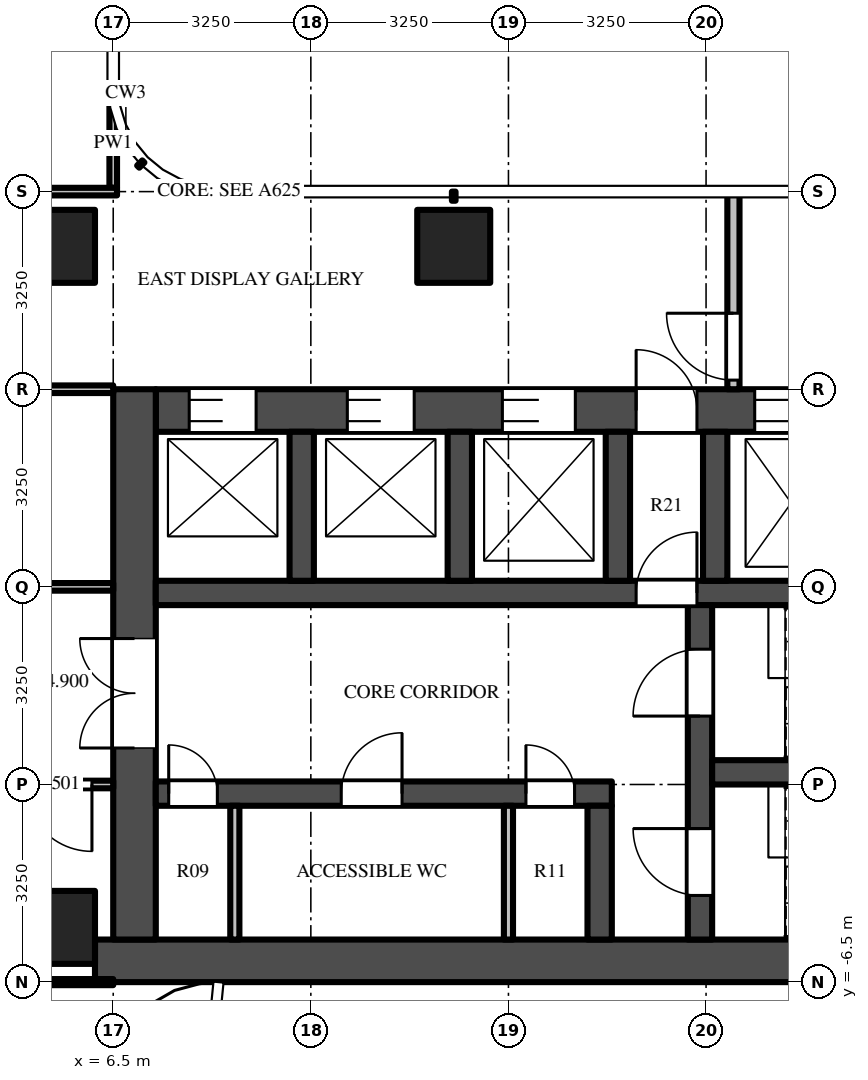
"""IFC4 building model, lengths in metres.
Left out: names, types, materials, properties, quantities, classifications, styles, units other than length and angle.
Written with IfcOpenShell. Run it as: python <this file> out.ifc"""

import sys

from ifc_helpers import new_model, si_unit, direction, frame, frame_2d, origin, origin_2d, place, context, subcontext, project, spatial, rectangle, extrude, source, transform, mapped, element, fill, save


model = new_model("IFC4")
c1 = context("Model", 3, precision=1e-05, world=origin(), true_north=direction((0.0, 1.0)))
c2 = subcontext(c1, "Body", "Model", "MODEL_VIEW")
j1 = project(units=[si_unit("LENGTHUNIT", "METRE"), si_unit("PLANEANGLEUNIT", "RADIAN")], contexts=[c1])
p1 = place(None, origin())
s1 = spatial("IfcSite", under=j1, at=p1, CompositionType="ELEMENT")
p2 = place(p1, origin())
s2 = spatial("IfcBuilding", under=s1, at=p2, CompositionType="ELEMENT")
p3 = place(p2, frame((0.0, 0.0, 204.9)))
s3 = spatial("IfcBuildingStorey", under=s2, at=p3, CompositionType="ELEMENT", Elevation=204.9)
m1 = source(origin(), c2, "Body", "SweptSolid", [
    extrude(rectangle(XDim=1.2, YDim=1.2, at=origin_2d()), origin(), (0.0, 0.0, 1.0), 3.9),
])
for number, where, z_axis, x_axis in (
    (1, (12.1, 5.6, 0.0), (0.0, 0.0, 1.0), (1.0, 0.0, 0.0)),
    (2, (5.6, 5.6, 0.0), (0.0, 0.0, 1.0), (1.0, 0.0, 0.0)),
    (3, (5.6, -5.6, 0.0), (0.0, 0.0, 1.0), (1.0, 0.0, 0.0)),
):
    element("IfcColumn", number, at=place(p3, frame(where, z_axis=z_axis, x_axis=x_axis)), inside=s3, PredefinedType="COLUMN", context=c2, shape_type="MappedRepresentation", body=[
        mapped(m1, transform((0.0, 0.0, 0.0))),
    ])
m2 = source(origin(), c2, "Body", "SweptSolid", [
    extrude(rectangle(XDim=16.55, YDim=0.7, at=frame_2d((8.275, 0.0))), origin(), (0.0, 0.0, 1.0), 3.7),
])
p4 = place(p3, frame((6.2, -6.15, 0.0), z_axis=(0.0, 0.0, 1.0), x_axis=(1.0, 0.0, 0.0)))
e4 = element("IfcWall", 4, at=p4, inside=s3, PredefinedType="SHEAR", context=c2, shape_type="MappedRepresentation", body=[
    mapped(m2, transform((0.0, 0.0, 0.0))),
])
m3 = source(origin(), c2, "Body", "SweptSolid", [
    extrude(rectangle(XDim=14.85, YDim=0.7, at=frame_2d((7.425, 0.0))), origin(), (0.0, 0.0, 1.0), 3.7),
])
p5 = place(p3, frame((7.2, 2.9, 0.0), z_axis=(0.0, 0.0, 1.0), x_axis=(1.0, 0.0, 0.0)))
e5 = element("IfcWall", 5, at=p5, inside=s3, PredefinedType="SHEAR", context=c2, shape_type="MappedRepresentation", body=[
    mapped(m3, transform((0.0, 0.0, 0.0))),
])
m4 = source(origin(), c2, "Body", "SweptSolid", [
    extrude(rectangle(XDim=1.1, YDim=2.1, at=frame_2d((0.55, 1.05))), frame((0.0, 0.36, 0.0), z_axis=(0.0, -1.0, 0.0), x_axis=(1.0, 0.0, 0.0)), (0.0, 0.0, 1.0), 0.72),
])
p6 = place(p5, frame((0.55, 0.0, 0.0)))
e6 = element("IfcOpeningElement", 6, at=p6, cuts=e5, PredefinedType="OPENING", context=c2, shape_type="MappedRepresentation", body=[
    mapped(m4, transform((0.0, 0.0, 0.0))),
])
p7 = place(p5, frame((3.15, 0.0, 0.0)))
e7 = element("IfcOpeningElement", 7, at=p7, cuts=e5, PredefinedType="OPENING", context=c2, shape_type="MappedRepresentation", body=[
    mapped(m4, transform((0.0, 0.0, 0.0))),
])
m5 = source(origin(), c2, "Body", "SweptSolid", [
    extrude(rectangle(XDim=1.2, YDim=2.1, at=frame_2d((0.6, 1.05))), frame((0.0, 0.36, 0.0), z_axis=(0.0, -1.0, 0.0), x_axis=(1.0, 0.0, 0.0)), (0.0, 0.0, 1.0), 0.72),
])
p8 = place(p5, frame((5.7, 0.0, 0.0)))
e8 = element("IfcOpeningElement", 8, at=p8, cuts=e5, PredefinedType="OPENING", context=c2, shape_type="MappedRepresentation", body=[
    mapped(m5, transform((0.0, 0.0, 0.0))),
])
m6 = source(origin(), c2, "Body", "SweptSolid", [
    extrude(rectangle(XDim=1.3, YDim=2.1, at=frame_2d((0.65, 1.05))), frame((0.0, 0.36, 0.0), z_axis=(0.0, -1.0, 0.0), x_axis=(1.0, 0.0, 0.0)), (0.0, 0.0, 1.0), 0.72),
])
p9 = place(p5, frame((12.2, 0.0, 0.0)))
e9 = element("IfcOpeningElement", 9, at=p9, cuts=e5, PredefinedType="OPENING", context=c2, shape_type="MappedRepresentation", body=[
    mapped(m6, transform((0.0, 0.0, 0.0))),
])
p10 = place(p5, frame((9.85, 0.0, 0.0)))
e10 = element("IfcOpeningElement", 10, at=p10, cuts=e5, PredefinedType="OPENING", context=c2, shape_type="MappedRepresentation", body=[
    mapped(m5, transform((0.0, 0.0, 0.0))),
])
m7 = source(origin(), c2, "Body", "SweptSolid", [
    extrude(rectangle(XDim=1.0, YDim=2.1, at=frame_2d((0.5, 1.05))), frame((0.0, 0.36, 0.0), z_axis=(0.0, -1.0, 0.0), x_axis=(1.0, 0.0, 0.0)), (0.0, 0.0, 1.0), 0.72),
])
p11 = place(p5, frame((7.9, 0.0, 0.0)))
e11 = element("IfcOpeningElement", 11, at=p11, cuts=e5, PredefinedType="OPENING", context=c2, shape_type="MappedRepresentation", body=[
    mapped(m7, transform((0.0, 0.0, 0.0))),
])
m8 = source(origin(), c2, "Body", "SweptSolid", [
    extrude(rectangle(XDim=9.05, YDim=0.7, at=frame_2d((4.525, 0.0))), origin(), (0.0, 0.0, 1.0), 3.7),
])
p12 = place(p3, frame((6.85, -5.8, 0.0), z_axis=(0.0, 0.0, 1.0), x_axis=(0.0, 1.0, 0.0)))
e12 = element("IfcWall", 12, at=p12, inside=s3, PredefinedType="SHEAR", context=c2, shape_type="MappedRepresentation", body=[
    mapped(m8, transform((0.0, 0.0, 0.0))),
])
m9 = source(origin(), c2, "Body", "SweptSolid", [
    extrude(rectangle(XDim=1.8, YDim=2.1, at=frame_2d((0.9, 1.05))), frame((0.0, 0.36, 0.0), z_axis=(0.0, -1.0, 0.0), x_axis=(1.0, 0.0, 0.0)), (0.0, 0.0, 1.0), 0.72),
])
p13 = place(p12, frame((3.15, 0.0, 0.0)))
e13 = element("IfcOpeningElement", 13, at=p13, cuts=e12, PredefinedType="OPENING", context=c2, shape_type="MappedRepresentation", body=[
    mapped(m9, transform((0.0, 0.0, 0.0))),
])
m10 = source(origin(), c2, "Body", "SweptSolid", [
    extrude(rectangle(XDim=7.5, YDim=0.4, at=frame_2d((3.75, 0.0))), origin(), (0.0, 0.0, 1.0), 3.7),
])
p14 = place(p3, frame((7.2, -3.4, 0.0), z_axis=(0.0, 0.0, 1.0), x_axis=(1.0, 0.0, 0.0)))
e14 = element("IfcWall", 14, at=p14, inside=s3, PredefinedType="SHEAR", context=c2, shape_type="MappedRepresentation", body=[
    mapped(m10, transform((0.0, 0.0, 0.0))),
])
m11 = source(origin(), c2, "Body", "SweptSolid", [
    extrude(rectangle(XDim=0.8, YDim=2.1, at=frame_2d((0.4, 1.05))), frame((0.0, 0.21, 0.0), z_axis=(0.0, -1.0, 0.0), x_axis=(1.0, 0.0, 0.0)), (0.0, 0.0, 1.0), 0.42),
])
p15 = place(p14, frame((0.212, 0.0, 0.0)))
e15 = element("IfcOpeningElement", 15, at=p15, cuts=e14, PredefinedType="OPENING", context=c2, shape_type="MappedRepresentation", body=[
    mapped(m11, transform((0.0, 0.0, 0.0))),
])
m12 = source(origin(), c2, "Body", "SweptSolid", [
    extrude(rectangle(XDim=1.0, YDim=2.1, at=frame_2d((0.5, 1.05))), frame((0.0, 0.21, 0.0), z_axis=(0.0, -1.0, 0.0), x_axis=(1.0, 0.0, 0.0)), (0.0, 0.0, 1.0), 0.42),
])
p16 = place(p14, frame((3.05, 0.0, 0.0)))
e16 = element("IfcOpeningElement", 16, at=p16, cuts=e14, PredefinedType="OPENING", context=c2, shape_type="MappedRepresentation", body=[
    mapped(m12, transform((0.0, 0.0, 0.0))),
])
p17 = place(p14, frame((6.087, 0.0, 0.0)))
e17 = element("IfcOpeningElement", 17, at=p17, cuts=e14, PredefinedType="OPENING", context=c2, shape_type="MappedRepresentation", body=[
    mapped(m11, transform((0.0, 0.0, 0.0))),
])
m13 = source(origin(), c2, "Body", "SweptSolid", [
    extrude(rectangle(XDim=14.85, YDim=0.4, at=frame_2d((7.425, 0.0))), origin(), (0.0, 0.0, 1.0), 3.7),
])
p18 = place(p3, frame((7.2, -0.1, 0.0), z_axis=(0.0, 0.0, 1.0), x_axis=(1.0, 0.0, 0.0)))
e18 = element("IfcWall", 18, at=p18, inside=s3, PredefinedType="SHEAR", context=c2, shape_type="MappedRepresentation", body=[
    mapped(m13, transform((0.0, 0.0, 0.0))),
])
p19 = place(p18, frame((7.9, 0.0, 0.0)))
e19 = element("IfcOpeningElement", 19, at=p19, cuts=e18, PredefinedType="OPENING", context=c2, shape_type="MappedRepresentation", body=[
    mapped(m12, transform((0.0, 0.0, 0.0))),
])
m14 = source(origin(), c2, "Body", "SweptSolid", [
    extrude(rectangle(XDim=5.5, YDim=0.4, at=frame_2d((2.75, 0.0))), origin(), (0.0, 0.0, 1.0), 3.7),
])
p20 = place(p3, frame((16.15, -5.8, 0.0), z_axis=(0.0, 0.0, 1.0), x_axis=(0.0, 1.0, 0.0)))
e20 = element("IfcWall", 20, at=p20, inside=s3, PredefinedType="SHEAR", context=c2, shape_type="MappedRepresentation", body=[
    mapped(m14, transform((0.0, 0.0, 0.0))),
])
m15 = source(origin(), c2, "Body", "SweptSolid", [
    extrude(rectangle(XDim=1.1, YDim=2.1, at=frame_2d((0.55, 1.05))), frame((0.0, 0.21, 0.0), z_axis=(0.0, -1.0, 0.0), x_axis=(1.0, 0.0, 0.0)), (0.0, 0.0, 1.0), 0.42),
])
p21 = place(p20, frame((0.725, 0.0, 0.0)))
e21 = element("IfcOpeningElement", 21, at=p21, cuts=e20, PredefinedType="OPENING", context=c2, shape_type="MappedRepresentation", body=[
    mapped(m15, transform((0.0, 0.0, 0.0))),
])
p22 = place(p20, frame((3.675, 0.0, 0.0)))
e22 = element("IfcOpeningElement", 22, at=p22, cuts=e20, PredefinedType="OPENING", context=c2, shape_type="MappedRepresentation", body=[
    mapped(m15, transform((0.0, 0.0, 0.0))),
])
m16 = source(origin(), c2, "Body", "SweptSolid", [
    extrude(rectangle(XDim=5.7, YDim=0.4, at=frame_2d((2.85, 0.0))), origin(), (0.0, 0.0, 1.0), 3.7),
])
p23 = place(p3, frame((16.35, -3.05, 0.0), z_axis=(0.0, 0.0, 1.0), x_axis=(1.0, 0.0, 0.0)))
e23 = element("IfcWall", 23, at=p23, inside=s3, PredefinedType="SHEAR", context=c2, shape_type="MappedRepresentation", body=[
    mapped(m16, transform((0.0, 0.0, 0.0))),
])
m17 = source(origin(), c2, "Body", "SweptSolid", [
    extrude(rectangle(XDim=2.2, YDim=0.4, at=frame_2d((1.1, 0.0))), origin(), (0.0, 0.0, 1.0), 3.7),
])
p24 = place(p3, frame((14.5, -5.8, 0.0), z_axis=(0.0, 0.0, 1.0), x_axis=(0.0, 1.0, 0.0)))
e24 = element("IfcWall", 24, at=p24, inside=s3, PredefinedType="SHEAR", context=c2, shape_type="MappedRepresentation", body=[
    mapped(m17, transform((0.0, 0.0, 0.0))),
])
m18 = source(origin(), c2, "Body", "SweptSolid", [
    extrude(rectangle(XDim=2.45, YDim=0.4, at=frame_2d((1.225, 0.0))), origin(), (0.0, 0.0, 1.0), 3.7),
])
for number, where, z_axis, x_axis in (
    (25, (9.6, 0.1, 0.0), (0.0, 0.0, 1.0), (0.0, 1.0, 0.0)),
    (26, (12.2, 0.1, 0.0), (0.0, 0.0, 1.0), (0.0, 1.0, 0.0)),
    (27, (14.8, 0.1, 0.0), (0.0, 0.0, 1.0), (0.0, 1.0, 0.0)),
    (28, (16.4, 0.1, 0.0), (0.0, 0.0, 1.0), (0.0, 1.0, 0.0)),
):
    element("IfcWall", number, at=place(p3, frame(where, z_axis=z_axis, x_axis=x_axis)), inside=s3, PredefinedType="SHEAR", context=c2, shape_type="MappedRepresentation", body=[
        mapped(m18, transform((0.0, 0.0, 0.0))),
    ])
m19 = source(origin(), c2, "Body", "SweptSolid", [
    extrude(rectangle(XDim=3.25, YDim=0.2, at=frame_2d((1.625, 0.0))), origin(), (0.0, 0.0, 1.0), 3.7),
])
p25 = place(p3, frame((16.7, 3.25, 0.0), z_axis=(0.0, 0.0, 1.0), x_axis=(0.0, 1.0, 0.0)))
e29 = element("IfcWall", 29, at=p25, inside=s3, PredefinedType="PARTITIONING", context=c2, shape_type="MappedRepresentation", body=[
    mapped(m19, transform((0.0, 0.0, 0.0))),
])
m20 = source(origin(), c2, "Body", "SweptSolid", [
    extrude(rectangle(XDim=1.1, YDim=2.1, at=frame_2d((0.55, 1.05))), frame((0.0, 0.11, 0.0), z_axis=(0.0, -1.0, 0.0), x_axis=(1.0, 0.0, 0.0)), (0.0, 0.0, 1.0), 0.22),
])
p26 = place(p25, frame((0.15, 0.0, 0.0)))
e30 = element("IfcOpeningElement", 30, at=p26, cuts=e29, PredefinedType="OPENING", context=c2, shape_type="MappedRepresentation", body=[
    mapped(m20, transform((0.0, 0.0, 0.0))),
])
m21 = source(origin(), c2, "Body", "SweptSolid", [
    extrude(rectangle(XDim=2.2, YDim=0.15, at=frame_2d((1.1, 0.0))), origin(), (0.0, 0.0, 1.0), 3.7),
])
for number, where, z_axis, x_axis in (
    (31, (8.5, -5.8, 0.0), (0.0, 0.0, 1.0), (0.0, 1.0, 0.0)),
    (32, (13.0, -5.8, 0.0), (0.0, 0.0, 1.0), (0.0, 1.0, 0.0)),
):
    element("IfcWall", number, at=place(p3, frame(where, z_axis=z_axis, x_axis=x_axis)), inside=s3, PredefinedType="PARTITIONING", context=c2, shape_type="MappedRepresentation", body=[
        mapped(m21, transform((0.0, 0.0, 0.0))),
    ])
m22 = source(origin(), c2, "Body", "SweptSolid", [
    extrude(rectangle(XDim=1.469, YDim=0.125, at=frame_2d((0.734, 0.0))), origin(), (0.0, 0.0, 1.0), 3.7),
])
p27 = place(p3, frame((6.5, 6.562, 0.0), z_axis=(0.0, 0.0, 1.0), x_axis=(0.0, 1.0, 0.0)))
e33 = element("IfcWall", 33, at=p27, inside=s3, PredefinedType="PARTITIONING", context=c2, shape_type="MappedRepresentation", body=[
    mapped(m22, transform((0.0, 0.0, 0.0))),
])
m23 = source(origin(), c2, "Body", "SweptSolid", [
    extrude(rectangle(XDim=5.238, YDim=0.1, at=frame_2d((2.619, 0.0))), origin(), (0.0, 0.0, 1.0), 2.78),
])
p28 = place(p3, frame((1.262, -6.5, 0.0), z_axis=(0.0, 0.0, 1.0), x_axis=(1.0, 0.0, 0.0)))
e34 = element("IfcWall", 34, at=p28, inside=s3, PredefinedType="PARTITIONING", context=c2, shape_type="MappedRepresentation", body=[
    mapped(m23, transform((0.0, 0.0, 0.0))),
])
m24 = source(origin(), c2, "Body", "SweptSolid", [
    extrude(rectangle(XDim=5.363, YDim=0.125, at=frame_2d((2.681, 0.0))), origin(), (0.0, 0.0, 1.0), 2.997),
])
p29 = place(p3, frame((6.5, -3.25, 0.0), z_axis=(0.0, 0.0, 1.0), x_axis=(-1.0, 0.0, 0.0)))
e35 = element("IfcWall", 35, at=p29, inside=s3, PredefinedType="PARTITIONING", context=c2, shape_type="MappedRepresentation", body=[
    mapped(m24, transform((0.0, 0.0, 0.0))),
])
m25 = source(origin(), c2, "Body", "SweptSolid", [
    extrude(rectangle(XDim=1.1, YDim=2.1, at=frame_2d((0.55, 1.05))), frame((0.0, 0.073, 0.0), z_axis=(0.0, -1.0, 0.0), x_axis=(1.0, 0.0, 0.0)), (0.0, 0.0, 1.0), 0.145),
])
p30 = place(p29, frame((0.35, 0.0, 0.0)))
e36 = element("IfcOpeningElement", 36, at=p30, cuts=e35, PredefinedType="OPENING", context=c2, shape_type="MappedRepresentation", body=[
    mapped(m25, transform((0.0, 0.0, 0.0))),
])
p31 = place(p3, frame((6.5, 0.0, 0.0), z_axis=(0.0, 0.0, 1.0), x_axis=(-1.0, 0.0, 0.0)))
e37 = element("IfcWall", 37, at=p31, inside=s3, PredefinedType="PARTITIONING", context=c2, shape_type="MappedRepresentation", body=[
    mapped(m24, transform((0.0, 0.0, 0.0))),
])
m26 = source(origin(), c2, "Body", "SweptSolid", [
    extrude(rectangle(XDim=1.0, YDim=2.1, at=frame_2d((0.5, 1.05))), frame((0.0, 0.073, 0.0), z_axis=(0.0, -1.0, 0.0), x_axis=(1.0, 0.0, 0.0)), (0.0, 0.0, 1.0), 0.145),
])
p32 = place(p31, frame((3.95, 0.0, 0.0)))
e38 = element("IfcOpeningElement", 38, at=p32, cuts=e37, PredefinedType="OPENING", context=c2, shape_type="MappedRepresentation", body=[
    mapped(m26, transform((0.0, 0.0, 0.0))),
])
p33 = place(p3, frame((1.137, 3.25, 0.0), z_axis=(0.0, 0.0, 1.0), x_axis=(1.0, 0.0, 0.0)))
e39 = element("IfcWall", 39, at=p33, inside=s3, PredefinedType="PARTITIONING", context=c2, shape_type="MappedRepresentation", body=[
    mapped(m24, transform((0.0, 0.0, 0.0))),
])
m27 = source(origin(), c2, "Body", "SweptSolid", [
    extrude(rectangle(XDim=5.425, YDim=0.125, at=frame_2d((2.712, 0.0))), origin(), (0.0, 0.0, 1.0), 2.78),
])
p34 = place(p3, frame((1.137, 6.5, 0.0), z_axis=(0.0, 0.0, 1.0), x_axis=(1.0, 0.0, 0.0)))
e40 = element("IfcWall", 40, at=p34, inside=s3, PredefinedType="PARTITIONING", context=c2, shape_type="MappedRepresentation", body=[
    mapped(m27, transform((0.0, 0.0, 0.0))),
])
m28 = source(origin(), c2, "Body", "SweptSolid", [
    extrude(rectangle(XDim=1.1, YDim=2.1, at=frame_2d((0.55, 1.05))), frame((0.0, -0.275, 0.0), z_axis=(0.0, -1.0, 0.0), x_axis=(1.0, 0.0, 0.0)), (0.0, 0.0, 1.0), 0.05),
])
p35 = place(p6, origin())
e41 = element("IfcDoor", 41, at=p35, inside=s3, OperationType="DOUBLE_DOOR_SLIDING", PredefinedType="DOOR", context=c2, shape_type="MappedRepresentation", body=[
    mapped(m28, transform((0.0, 0.0, 0.0))),
])
fill(e6, e41)
p36 = place(p7, origin())
e42 = element("IfcDoor", 42, at=p36, inside=s3, OperationType="DOUBLE_DOOR_SLIDING", PredefinedType="DOOR", context=c2, shape_type="MappedRepresentation", body=[
    mapped(m28, transform((0.0, 0.0, 0.0))),
])
fill(e7, e42)
m29 = source(origin(), c2, "Body", "SweptSolid", [
    extrude(rectangle(XDim=1.2, YDim=2.1, at=frame_2d((0.6, 1.05))), frame((0.0, -0.275, 0.0), z_axis=(0.0, -1.0, 0.0), x_axis=(1.0, 0.0, 0.0)), (0.0, 0.0, 1.0), 0.05),
])
p37 = place(p8, origin())
e43 = element("IfcDoor", 43, at=p37, inside=s3, OperationType="DOUBLE_DOOR_SLIDING", PredefinedType="DOOR", context=c2, shape_type="MappedRepresentation", body=[
    mapped(m29, transform((0.0, 0.0, 0.0))),
])
fill(e8, e43)
p38 = place(p10, origin())
e44 = element("IfcDoor", 44, at=p38, inside=s3, OperationType="DOUBLE_DOOR_SLIDING", PredefinedType="DOOR", context=c2, shape_type="MappedRepresentation", body=[
    mapped(m29, transform((0.0, 0.0, 0.0))),
])
fill(e10, e44)
m30 = source(origin(), c2, "Body", "SweptSolid", [
    extrude(rectangle(XDim=1.8, YDim=2.1, at=frame_2d((0.9, 1.05))), frame((0.0, -0.275, 0.0), z_axis=(0.0, -1.0, 0.0), x_axis=(1.0, 0.0, 0.0)), (0.0, 0.0, 1.0), 0.05),
])
p39 = place(p13, origin())
e45 = element("IfcDoor", 45, at=p39, inside=s3, OperationType="DOUBLE_DOOR_SINGLE_SWING", PredefinedType="DOOR", context=c2, shape_type="MappedRepresentation", body=[
    mapped(m30, transform((0.0, 0.0, 0.0))),
])
fill(e13, e45)
m31 = source(origin(), c2, "Body", "SweptSolid", [
    extrude(rectangle(XDim=1.1, YDim=2.1, at=frame_2d((0.55, 1.05))), frame((0.0, 0.025, 0.0), z_axis=(0.0, -1.0, 0.0), x_axis=(1.0, 0.0, 0.0)), (0.0, 0.0, 1.0), 0.05),
])
p40 = place(p21, origin())
e46 = element("IfcDoor", 46, at=p40, inside=s3, OperationType="SINGLE_SWING_RIGHT", PredefinedType="DOOR", context=c2, shape_type="MappedRepresentation", body=[
    mapped(m31, transform((0.0, 0.0, 0.0))),
])
fill(e21, e46)
p41 = place(p22, origin())
e47 = element("IfcDoor", 47, at=p41, inside=s3, OperationType="SINGLE_SWING_LEFT", PredefinedType="DOOR", context=c2, shape_type="MappedRepresentation", body=[
    mapped(m31, transform((0.0, 0.0, 0.0))),
])
fill(e22, e47)
m32 = source(origin(), c2, "Body", "SweptSolid", [
    extrude(rectangle(XDim=1.0, YDim=2.1, at=frame_2d((0.5, 1.05))), frame((0.0, 0.025, 0.0), z_axis=(0.0, -1.0, 0.0), x_axis=(1.0, 0.0, 0.0)), (0.0, 0.0, 1.0), 0.05),
])
p42 = place(p19, origin())
e48 = element("IfcDoor", 48, at=p42, inside=s3, OperationType="SINGLE_SWING_RIGHT", PredefinedType="DOOR", context=c2, shape_type="MappedRepresentation", body=[
    mapped(m32, transform((0.0, 0.0, 0.0))),
])
fill(e19, e48)
m33 = source(origin(), c2, "Body", "SweptSolid", [
    extrude(rectangle(XDim=1.0, YDim=2.1, at=frame_2d((0.5, 1.05))), frame((0.0, -0.275, 0.0), z_axis=(0.0, -1.0, 0.0), x_axis=(1.0, 0.0, 0.0)), (0.0, 0.0, 1.0), 0.05),
])
p43 = place(p11, origin())
e49 = element("IfcDoor", 49, at=p43, inside=s3, OperationType="SINGLE_SWING_LEFT", PredefinedType="DOOR", context=c2, shape_type="MappedRepresentation", body=[
    mapped(m33, transform((0.0, 0.0, 0.0))),
])
fill(e11, e49)
p44 = place(p26, origin())
e50 = element("IfcDoor", 50, at=p44, inside=s3, OperationType="SINGLE_SWING_RIGHT", PredefinedType="DOOR", context=c2, shape_type="MappedRepresentation", body=[
    mapped(m31, transform((0.0, 0.0, 0.0))),
])
fill(e30, e50)
m34 = source(origin(), c2, "Body", "SweptSolid", [
    extrude(rectangle(XDim=0.8, YDim=2.1, at=frame_2d((0.4, 1.05))), frame((0.0, 0.025, 0.0), z_axis=(0.0, -1.0, 0.0), x_axis=(1.0, 0.0, 0.0)), (0.0, 0.0, 1.0), 0.05),
])
p45 = place(p15, origin())
e51 = element("IfcDoor", 51, at=p45, inside=s3, OperationType="SINGLE_SWING_LEFT", PredefinedType="DOOR", context=c2, shape_type="MappedRepresentation", body=[
    mapped(m34, transform((0.0, 0.0, 0.0))),
])
fill(e15, e51)
p46 = place(p16, origin())
e52 = element("IfcDoor", 52, at=p46, inside=s3, OperationType="SINGLE_SWING_RIGHT", PredefinedType="DOOR", context=c2, shape_type="MappedRepresentation", body=[
    mapped(m32, transform((0.0, 0.0, 0.0))),
])
fill(e16, e52)
p47 = place(p17, origin())
e53 = element("IfcDoor", 53, at=p47, inside=s3, OperationType="SINGLE_SWING_LEFT", PredefinedType="DOOR", context=c2, shape_type="MappedRepresentation", body=[
    mapped(m34, transform((0.0, 0.0, 0.0))),
])
fill(e17, e53)
p48 = place(p30, origin())
e54 = element("IfcDoor", 54, at=p48, inside=s3, OperationType="SINGLE_SWING_LEFT", PredefinedType="DOOR", context=c2, shape_type="MappedRepresentation", body=[
    mapped(m31, transform((0.0, 0.0, 0.0))),
])
fill(e36, e54)
save(model, sys.argv[1])
